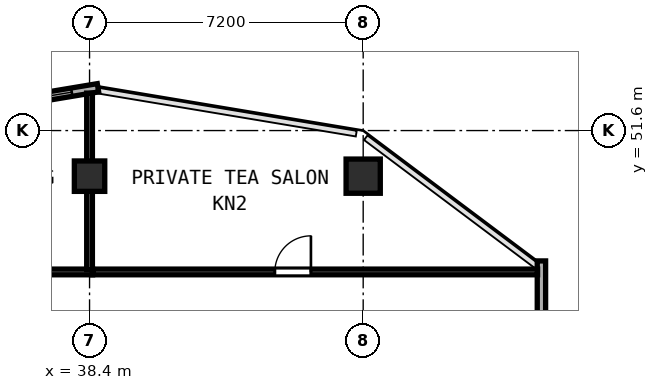
"""IFC4 building model, lengths in metres.
Left out: names, types, materials, properties, quantities, classifications, styles, units other than length and angle.
Written with IfcOpenShell. Run it as: python <this file> out.ifc"""

import sys

from ifc_helpers import new_model, si_unit, direction, frame, frame_2d, origin, origin_2d, place, context, subcontext, project, spatial, rectangle, hollow_rectangle, extrude, element, fill, save


model = new_model("IFC4")
c1 = context("Model", 3, precision=1e-05, world=origin(), true_north=direction((0.0, 1.0)))
c2 = subcontext(c1, "Body", "Model", "MODEL_VIEW")
j1 = project(units=[si_unit("LENGTHUNIT", "METRE"), si_unit("PLANEANGLEUNIT", "RADIAN")], contexts=[c1])
p1 = place(None, origin())
s1 = spatial("IfcSite", under=j1, at=p1, CompositionType="ELEMENT")
p2 = place(p1, origin())
s2 = spatial("IfcBuilding", under=s1, at=p2, CompositionType="ELEMENT")
p3 = place(p2, frame((0.0, 0.0, 176.6)))
s3 = spatial("IfcBuildingStorey", under=s2, at=p3, CompositionType="ELEMENT", Elevation=176.6)
p4 = place(p3, frame((45.6, 50.4, 0.0), z_axis=(0.0, 0.0, 1.0), x_axis=(1.0, 0.0, 0.0)))
e1 = element("IfcColumn", 1, at=p4, inside=s3, PredefinedType="COLUMN", context=c2, shape_type="SweptSolid", body=[
    extrude(hollow_rectangle(XDim=0.9, YDim=0.9, WallThickness=0.034, at=origin_2d()), origin(), (0.0, 0.0, 1.0), 3.8),
])
p5 = place(p3, frame((38.4, 50.4, 0.0), z_axis=(0.0, 0.0, 1.0), x_axis=(1.0, 0.0, 0.0)))
e2 = element("IfcColumn", 2, at=p5, inside=s3, PredefinedType="COLUMN", context=c2, shape_type="SweptSolid", body=[
    extrude(hollow_rectangle(XDim=0.8, YDim=0.8, WallThickness=0.03, at=origin_2d()), origin(), (0.0, 0.0, 1.0), 3.8),
])
p6 = place(p3, frame((50.29, 46.635, 0.0), z_axis=(0.0, 0.0, 1.0), x_axis=(0.0, 1.0, 0.0)))
e3 = element("IfcWall", 3, at=p6, inside=s3, PredefinedType="SOLIDWALL", context=c2, shape_type="SweptSolid", body=[
    extrude(rectangle(XDim=1.535, YDim=0.22, at=frame_2d((0.768, 0.0))), origin(), (0.0, 0.0, 1.0), 3.62),
])
p7 = place(p3, frame((38.622, 52.726, 0.0), z_axis=(0.0, 0.0, 1.0), x_axis=(-0.986390420428, -0.164420006349, 0.0)))
e4 = element("IfcWall", 4, at=p7, inside=s3, PredefinedType="SOLIDWALL", context=c2, shape_type="SweptSolid", body=[
    extrude(rectangle(XDim=7.534, YDim=0.22, at=frame_2d((3.767, 0.0))), origin(), (0.0, 0.0, 1.0), 3.62),
])
p8 = place(p7, frame((0.7, 0.0, 0.85)))
e5 = element("IfcOpeningElement", 5, at=p8, cuts=e4, PredefinedType="OPENING", context=c2, shape_type="SweptSolid", body=[
    extrude(rectangle(XDim=1.1, YDim=1.75, at=frame_2d((0.55, 0.875))), frame((0.0, 0.12, 0.0), z_axis=(0.0, -1.0, 0.0), x_axis=(1.0, 0.0, 0.0)), (0.0, 0.0, 1.0), 0.24),
])
p9 = place(p3, frame((26.612, 47.88, 0.0), z_axis=(0.0, 0.0, 1.0), x_axis=(1.0, 0.0, 0.0)))
e6 = element("IfcWall", 6, at=p9, inside=s3, PredefinedType="PARTITIONING", context=c2, shape_type="SweptSolid", body=[
    extrude(rectangle(XDim=11.868, YDim=0.15, at=frame_2d((5.934, 0.0))), origin(), (0.0, 0.0, 1.0), 3.62),
])
p10 = place(p9, frame((5.883, 0.0, 0.0)))
e7 = element("IfcOpeningElement", 7, at=p10, cuts=e6, PredefinedType="OPENING", context=c2, shape_type="SweptSolid", body=[
    extrude(rectangle(XDim=0.95, YDim=2.12, at=frame_2d((0.475, 1.06))), frame((0.0, 0.085, 0.0), z_axis=(0.0, -1.0, 0.0), x_axis=(1.0, 0.0, 0.0)), (0.0, 0.0, 1.0), 0.17),
])
p11 = place(p3, frame((38.4, 47.94, 0.0), z_axis=(0.0, 0.0, 1.0), x_axis=(0.0, 1.0, 0.0)))
e8 = element("IfcWall", 8, at=p11, inside=s3, PredefinedType="PARTITIONING", context=c2, shape_type="SweptSolid", body=[
    extrude(rectangle(XDim=4.645, YDim=0.15, at=frame_2d((2.323, 0.0))), origin(), (0.0, 0.0, 1.0), 3.62),
])
p12 = place(p3, frame((38.482, 47.88, 0.0), z_axis=(0.0, 0.0, 1.0), x_axis=(1.0, 0.0, 0.0)))
e9 = element("IfcWall", 9, at=p12, inside=s3, PredefinedType="PARTITIONING", context=c2, shape_type="SweptSolid", body=[
    extrude(rectangle(XDim=11.706, YDim=0.15, at=frame_2d((5.853, 0.0))), origin(), (0.0, 0.0, 1.0), 3.62),
])
p13 = place(p12, frame((4.793, 0.0, 0.0)))
e10 = element("IfcOpeningElement", 10, at=p13, cuts=e9, PredefinedType="OPENING", context=c2, shape_type="SweptSolid", body=[
    extrude(rectangle(XDim=0.95, YDim=2.12, at=frame_2d((0.475, 1.06))), frame((0.0, 0.085, 0.0), z_axis=(0.0, -1.0, 0.0), x_axis=(1.0, 0.0, 0.0)), (0.0, 0.0, 1.0), 0.17),
])
p14 = place(p8, origin())
e11 = element("IfcWindow", 11, at=p14, inside=s3, PartitioningType="SINGLE_PANEL", PredefinedType="WINDOW", context=c2, shape_type="SweptSolid", body=[
    extrude(rectangle(XDim=1.1, YDim=1.75, at=frame_2d((0.55, 0.875))), frame((0.0, 0.03, 0.0), z_axis=(0.0, -1.0, 0.0), x_axis=(1.0, 0.0, 0.0)), (0.0, 0.0, 1.0), 0.06),
])
fill(e5, e11)
p15 = place(p13, origin())
e12 = element("IfcDoor", 12, at=p15, inside=s3, OperationType="SINGLE_SWING_RIGHT", PredefinedType="DOOR", context=c2, shape_type="SweptSolid", body=[
    extrude(rectangle(XDim=0.95, YDim=2.12, at=frame_2d((0.475, 1.06))), frame((0.0, 0.025, 0.0), z_axis=(0.0, -1.0, 0.0), x_axis=(1.0, 0.0, 0.0)), (0.0, 0.0, 1.0), 0.05),
])
fill(e10, e12)
save(model, sys.argv[1])
